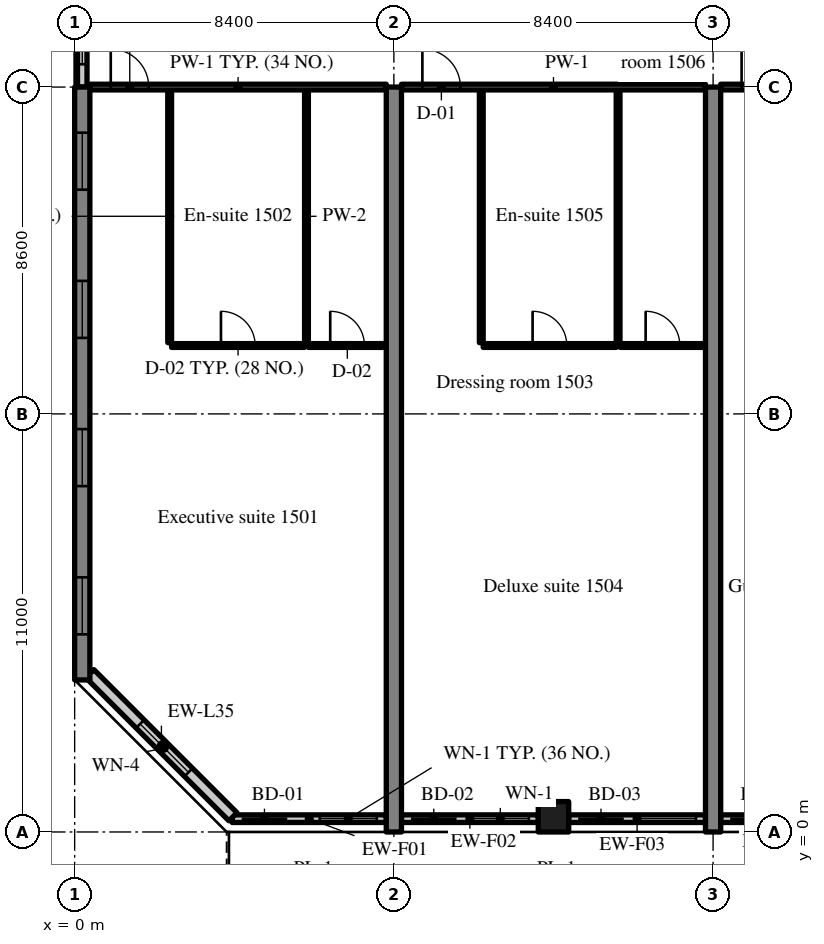
"""IFC4 building model, lengths in metres.
Left out: names, types, materials, properties, quantities, classifications, styles, units other than length and angle.
Written with IfcOpenShell. Run it as: python <this file> out.ifc"""

import sys

from ifc_helpers import new_model, si_unit, direction, frame, frame_2d, origin, origin_2d, place, context, subcontext, project, spatial, rectangle, extrude, source, transform, mapped, element, fill, save


model = new_model("IFC4")
c1 = context("Model", 3, precision=1e-05, world=origin(), true_north=direction((0.0, 1.0)))
c2 = subcontext(c1, "Body", "Model", "MODEL_VIEW")
j1 = project(units=[si_unit("LENGTHUNIT", "METRE"), si_unit("PLANEANGLEUNIT", "RADIAN")], contexts=[c1])
p1 = place(None, origin())
s1 = spatial("IfcSite", under=j1, at=p1, CompositionType="ELEMENT")
p2 = place(p1, origin())
s2 = spatial("IfcBuilding", under=s1, at=p2, CompositionType="ELEMENT")
p3 = place(p2, frame((0.0, 0.0, 65.8)))
s3 = spatial("IfcBuildingStorey", under=s2, at=p3, CompositionType="ELEMENT", Elevation=65.8)
m1 = source(origin(), c2, "Body", "SweptSolid", [
    extrude(rectangle(XDim=15.6, YDim=0.4, at=frame_2d((7.8, 0.0))), origin(), (0.0, 0.0, 1.0), 3.52),
])
p4 = place(p3, frame((0.2, 4.0, 0.0), z_axis=(0.0, 0.0, 1.0), x_axis=(0.0, 1.0, 0.0)))
e1 = element("IfcWall", 1, at=p4, inside=s3, PredefinedType="SHEAR", context=c2, shape_type="MappedRepresentation", body=[
    mapped(m1, transform((0.0, 0.0, 0.0), scale=1.0)),
])
m2 = source(origin(), c2, "Body", "SweptSolid", [
    extrude(rectangle(XDim=1.5, YDim=1.5, at=frame_2d((0.75, 0.75))), frame((0.0, 0.21, 0.0), z_axis=(0.0, -1.0, 0.0), x_axis=(1.0, 0.0, 0.0)), (0.0, 0.0, 1.0), 0.42),
])
p5 = place(p4, frame((1.2, 0.0, 0.9)))
e2 = element("IfcOpeningElement", 2, at=p5, cuts=e1, PredefinedType="OPENING", context=c2, shape_type="MappedRepresentation", body=[
    mapped(m2, transform((0.0, 0.0, 0.0), scale=1.0)),
])
p6 = place(p4, frame((5.1, 0.0, 0.9)))
e3 = element("IfcOpeningElement", 3, at=p6, cuts=e1, PredefinedType="OPENING", context=c2, shape_type="MappedRepresentation", body=[
    mapped(m2, transform((0.0, 0.0, 0.0), scale=1.0)),
])
p7 = place(p4, frame((9.0, 0.0, 0.9)))
e4 = element("IfcOpeningElement", 4, at=p7, cuts=e1, PredefinedType="OPENING", context=c2, shape_type="MappedRepresentation", body=[
    mapped(m2, transform((0.0, 0.0, 0.0), scale=1.0)),
])
p8 = place(p4, frame((12.9, 0.0, 0.9)))
e5 = element("IfcOpeningElement", 5, at=p8, cuts=e1, PredefinedType="OPENING", context=c2, shape_type="MappedRepresentation", body=[
    mapped(m2, transform((0.0, 0.0, 0.0), scale=1.0)),
])
m3 = source(origin(), c2, "Body", "SweptSolid", [
    extrude(rectangle(XDim=19.6, YDim=0.4, at=frame_2d((9.8, 0.0))), origin(), (0.0, 0.0, 1.0), 3.52),
])
for number, where, z_axis, x_axis in (
    (6, (8.4, 0.0, 0.0), (0.0, 0.0, 1.0), (0.0, 1.0, 0.0)),
    (7, (16.8, 0.0, 0.0), (0.0, 0.0, 1.0), (0.0, 1.0, 0.0)),
):
    element("IfcWall", number, at=place(p3, frame(where, z_axis=z_axis, x_axis=x_axis)), inside=s3, PredefinedType="SHEAR", context=c2, shape_type="MappedRepresentation", body=[
        mapped(m3, transform((0.0, 0.0, 0.0), scale=1.0)),
    ])
m4 = source(origin(), c2, "Body", "SweptSolid", [
    extrude(rectangle(XDim=0.8, YDim=0.8, at=origin_2d()), origin(), (0.0, 0.0, 1.0), 3.52),
])
p9 = place(p3, frame((12.6, 0.4, 0.0), z_axis=(0.0, 0.0, 1.0), x_axis=(1.0, 0.0, 0.0)))
e8 = element("IfcColumn", 8, at=p9, inside=s3, PredefinedType="COLUMN", context=c2, shape_type="MappedRepresentation", body=[
    mapped(m4, transform((0.0, 0.0, 0.0), scale=1.0)),
])
m5 = source(origin(), c2, "Body", "SweptSolid", [
    extrude(rectangle(XDim=4.055, YDim=0.2, at=frame_2d((2.027, 0.0))), origin(), (0.0, 0.0, 1.0), 2.82),
])
p10 = place(p3, frame((4.145, 0.35, 0.0), z_axis=(0.0, 0.0, 1.0), x_axis=(1.0, 0.0, 0.0)))
e9 = element("IfcWall", 9, at=p10, inside=s3, PredefinedType="SOLIDWALL", context=c2, shape_type="MappedRepresentation", body=[
    mapped(m5, transform((0.0, 0.0, 0.0), scale=1.0)),
])
m6 = source(origin(), c2, "Body", "SweptSolid", [
    extrude(rectangle(XDim=1.2, YDim=2.4, at=frame_2d((0.6, 1.2))), frame((0.0, 0.11, 0.0), z_axis=(0.0, -1.0, 0.0), x_axis=(1.0, 0.0, 0.0)), (0.0, 0.0, 1.0), 0.22),
])
p11 = place(p10, frame((0.25, 0.0, 0.0)))
e10 = element("IfcOpeningElement", 10, at=p11, cuts=e9, PredefinedType="OPENING", context=c2, shape_type="MappedRepresentation", body=[
    mapped(m6, transform((0.0, 0.0, 0.0), scale=1.0)),
])
m7 = source(origin(), c2, "Body", "SweptSolid", [
    extrude(rectangle(XDim=1.5, YDim=1.5, at=frame_2d((0.75, 0.75))), frame((0.0, 0.11, 0.0), z_axis=(0.0, -1.0, 0.0), x_axis=(1.0, 0.0, 0.0)), (0.0, 0.0, 1.0), 0.22),
])
p12 = place(p10, frame((2.305, 0.0, 0.9)))
e11 = element("IfcOpeningElement", 11, at=p12, cuts=e9, PredefinedType="OPENING", context=c2, shape_type="MappedRepresentation", body=[
    mapped(m7, transform((0.0, 0.0, 0.0), scale=1.0)),
])
m8 = source(origin(), c2, "Body", "SweptSolid", [
    extrude(rectangle(XDim=3.6, YDim=0.2, at=frame_2d((1.8, 0.0))), origin(), (0.0, 0.0, 1.0), 2.82),
])
p13 = place(p3, frame((8.6, 0.35, 0.0), z_axis=(0.0, 0.0, 1.0), x_axis=(1.0, 0.0, 0.0)))
e12 = element("IfcWall", 12, at=p13, inside=s3, PredefinedType="SOLIDWALL", context=c2, shape_type="MappedRepresentation", body=[
    mapped(m8, transform((0.0, 0.0, 0.0), scale=1.0)),
])
p14 = place(p13, frame((0.25, 0.0, 0.0)))
e13 = element("IfcOpeningElement", 13, at=p14, cuts=e12, PredefinedType="OPENING", context=c2, shape_type="MappedRepresentation", body=[
    mapped(m6, transform((0.0, 0.0, 0.0), scale=1.0)),
])
p15 = place(p13, frame((1.85, 0.0, 0.9)))
e14 = element("IfcOpeningElement", 14, at=p15, cuts=e12, PredefinedType="OPENING", context=c2, shape_type="MappedRepresentation", body=[
    mapped(m7, transform((0.0, 0.0, 0.0), scale=1.0)),
])
m9 = source(origin(), c2, "Body", "SweptSolid", [
    extrude(rectangle(XDim=3.6, YDim=0.2, at=frame_2d((1.8, 0.0))), origin(), (0.0, 0.0, 1.0), 2.82),
])
p16 = place(p3, frame((13.0, 0.35, 0.0), z_axis=(0.0, 0.0, 1.0), x_axis=(1.0, 0.0, 0.0)))
e15 = element("IfcWall", 15, at=p16, inside=s3, PredefinedType="SOLIDWALL", context=c2, shape_type="MappedRepresentation", body=[
    mapped(m9, transform((0.0, 0.0, 0.0), scale=1.0)),
])
p17 = place(p16, frame((0.25, 0.0, 0.0)))
e16 = element("IfcOpeningElement", 16, at=p17, cuts=e15, PredefinedType="OPENING", context=c2, shape_type="MappedRepresentation", body=[
    mapped(m6, transform((0.0, 0.0, 0.0), scale=1.0)),
])
p18 = place(p16, frame((1.85, 0.0, 0.9)))
e17 = element("IfcOpeningElement", 17, at=p18, cuts=e15, PredefinedType="OPENING", context=c2, shape_type="MappedRepresentation", body=[
    mapped(m7, transform((0.0, 0.0, 0.0), scale=1.0)),
])
p19 = place(p3, frame((17.0, 0.35, 0.0), z_axis=(0.0, 0.0, 1.0), x_axis=(1.0, 0.0, 0.0)))
e18 = element("IfcWall", 18, at=p19, inside=s3, PredefinedType="SOLIDWALL", context=c2, shape_type="MappedRepresentation", body=[
    mapped(m9, transform((0.0, 0.0, 0.0), scale=1.0)),
])
p20 = place(p19, frame((0.25, 0.0, 0.0)))
e19 = element("IfcOpeningElement", 19, at=p20, cuts=e18, PredefinedType="OPENING", context=c2, shape_type="MappedRepresentation", body=[
    mapped(m6, transform((0.0, 0.0, 0.0), scale=1.0)),
])
p21 = place(p19, frame((1.85, 0.0, 0.9)))
e20 = element("IfcOpeningElement", 20, at=p21, cuts=e18, PredefinedType="OPENING", context=c2, shape_type="MappedRepresentation", body=[
    mapped(m7, transform((0.0, 0.0, 0.0), scale=1.0)),
])
m10 = source(origin(), c2, "Body", "SweptSolid", [
    extrude(rectangle(XDim=5.326, YDim=0.3, at=frame_2d((2.663, 0.0))), origin(), (0.0, 0.0, 1.0), 3.52),
])
p22 = place(p3, frame((0.4, 4.166, 0.0), z_axis=(0.0, 0.0, 1.0), x_axis=(0.707106781187, -0.707106781187, 0.0)))
e21 = element("IfcWall", 21, at=p22, inside=s3, PredefinedType="SOLIDWALL", context=c2, shape_type="MappedRepresentation", body=[
    mapped(m10, transform((0.0, 0.0, 0.0), scale=1.0)),
])
m11 = source(origin(), c2, "Body", "SweptSolid", [
    extrude(rectangle(XDim=1.8, YDim=1.5, at=frame_2d((0.9, 0.75))), frame((0.0, 0.16, 0.0), z_axis=(0.0, -1.0, 0.0), x_axis=(1.0, 0.0, 0.0)), (0.0, 0.0, 1.0), 0.32),
])
p23 = place(p22, frame((1.871, 0.0, 0.9)))
e22 = element("IfcOpeningElement", 22, at=p23, cuts=e21, PredefinedType="OPENING", context=c2, shape_type="MappedRepresentation", body=[
    mapped(m11, transform((0.0, 0.0, 0.0), scale=1.0)),
])
m12 = source(origin(), c2, "Body", "SweptSolid", [
    extrude(rectangle(XDim=2.4, YDim=0.25, at=frame_2d((1.2, 0.0))), origin(), (0.0, 0.0, 1.0), 2.62),
])
p24 = place(p3, frame((0.2, 19.6, 0.0), z_axis=(0.0, 0.0, 1.0), x_axis=(0.0, 1.0, 0.0)))
e23 = element("IfcWall", 23, at=p24, inside=s3, PredefinedType="SOLIDWALL", context=c2, shape_type="MappedRepresentation", body=[
    mapped(m12, transform((0.0, 0.0, 0.0), scale=1.0)),
])
m13 = source(origin(), c2, "Body", "SweptSolid", [
    extrude(rectangle(XDim=1.2, YDim=1.5, at=frame_2d((0.6, 0.75))), frame((0.0, 0.135, 0.0), z_axis=(0.0, -1.0, 0.0), x_axis=(1.0, 0.0, 0.0)), (0.0, 0.0, 1.0), 0.27),
])
p25 = place(p24, frame((0.6, 0.0, 0.9)))
e24 = element("IfcOpeningElement", 24, at=p25, cuts=e23, PredefinedType="OPENING", context=c2, shape_type="MappedRepresentation", body=[
    mapped(m13, transform((0.0, 0.0, 0.0), scale=1.0)),
])
m14 = source(origin(), c2, "Body", "SweptSolid", [
    extrude(rectangle(XDim=6.65, YDim=0.1, at=frame_2d((3.325, 0.0))), origin(), (0.0, 0.0, 1.0), 3.52),
])
for number, where, z_axis, x_axis in (
    (25, (2.5, 12.875, 0.0), (0.0, 0.0, 1.0), (0.0, 1.0, 0.0)),
    (26, (6.1, 12.875, 0.0), (0.0, 0.0, 1.0), (0.0, 1.0, 0.0)),
):
    element("IfcWall", number, at=place(p3, frame(where, z_axis=z_axis, x_axis=x_axis)), inside=s3, PredefinedType="PARTITIONING", context=c2, shape_type="MappedRepresentation", body=[
        mapped(m14, transform((0.0, 0.0, 0.0), scale=1.0)),
    ])
m15 = source(origin(), c2, "Body", "SweptSolid", [
    extrude(rectangle(XDim=3.5, YDim=0.1, at=frame_2d((1.75, 0.0))), origin(), (0.0, 0.0, 1.0), 3.52),
])
p26 = place(p3, frame((2.55, 12.8, 0.0), z_axis=(0.0, 0.0, 1.0), x_axis=(1.0, 0.0, 0.0)))
e27 = element("IfcWall", 27, at=p26, inside=s3, PredefinedType="PARTITIONING", context=c2, shape_type="MappedRepresentation", body=[
    mapped(m15, transform((0.0, 0.0, 0.0), scale=1.0)),
])
m16 = source(origin(), c2, "Body", "SweptSolid", [
    extrude(rectangle(XDim=0.9, YDim=2.1, at=frame_2d((0.45, 1.05))), frame((0.0, 0.06, 0.0), z_axis=(0.0, -1.0, 0.0), x_axis=(1.0, 0.0, 0.0)), (0.0, 0.0, 1.0), 0.12),
])
p27 = place(p26, frame((1.3, 0.0, 0.0)))
e28 = element("IfcOpeningElement", 28, at=p27, cuts=e27, PredefinedType="OPENING", context=c2, shape_type="MappedRepresentation", body=[
    mapped(m16, transform((0.0, 0.0, 0.0), scale=1.0)),
])
m17 = source(origin(), c2, "Body", "SweptSolid", [
    extrude(rectangle(XDim=2.05, YDim=0.1, at=frame_2d((1.025, 0.0))), origin(), (0.0, 0.0, 1.0), 3.52),
])
p28 = place(p3, frame((6.15, 12.8, 0.0), z_axis=(0.0, 0.0, 1.0), x_axis=(1.0, 0.0, 0.0)))
e29 = element("IfcWall", 29, at=p28, inside=s3, PredefinedType="PARTITIONING", context=c2, shape_type="MappedRepresentation", body=[
    mapped(m17, transform((0.0, 0.0, 0.0), scale=1.0)),
])
p29 = place(p28, frame((0.575, 0.0, 0.0)))
e30 = element("IfcOpeningElement", 30, at=p29, cuts=e29, PredefinedType="OPENING", context=c2, shape_type="MappedRepresentation", body=[
    mapped(m16, transform((0.0, 0.0, 0.0), scale=1.0)),
])
m18 = source(origin(), c2, "Body", "SweptSolid", [
    extrude(rectangle(XDim=7.8, YDim=0.15, at=frame_2d((3.9, 0.0))), origin(), (0.0, 0.0, 1.0), 2.82),
])
p30 = place(p3, frame((0.4, 19.6, 0.0), z_axis=(0.0, 0.0, 1.0), x_axis=(1.0, 0.0, 0.0)))
e31 = element("IfcWall", 31, at=p30, inside=s3, PredefinedType="PARTITIONING", context=c2, shape_type="MappedRepresentation", body=[
    mapped(m18, transform((0.0, 0.0, 0.0), scale=1.0)),
])
m19 = source(origin(), c2, "Body", "SweptSolid", [
    extrude(rectangle(XDim=1.0, YDim=2.1, at=frame_2d((0.5, 1.05))), frame((0.0, 0.085, 0.0), z_axis=(0.0, -1.0, 0.0), x_axis=(1.0, 0.0, 0.0)), (0.0, 0.0, 1.0), 0.17),
])
p31 = place(p30, frame((0.55, 0.0, 0.0)))
e32 = element("IfcOpeningElement", 32, at=p31, cuts=e31, PredefinedType="OPENING", context=c2, shape_type="MappedRepresentation", body=[
    mapped(m19, transform((0.0, 0.0, 0.0), scale=1.0)),
])
for number, where, z_axis, x_axis in (
    (33, (10.7, 12.875, 0.0), (0.0, 0.0, 1.0), (0.0, 1.0, 0.0)),
    (34, (14.3, 12.875, 0.0), (0.0, 0.0, 1.0), (0.0, 1.0, 0.0)),
):
    element("IfcWall", number, at=place(p3, frame(where, z_axis=z_axis, x_axis=x_axis)), inside=s3, PredefinedType="PARTITIONING", context=c2, shape_type="MappedRepresentation", body=[
        mapped(m14, transform((0.0, 0.0, 0.0), scale=1.0)),
    ])
p32 = place(p3, frame((10.75, 12.8, 0.0), z_axis=(0.0, 0.0, 1.0), x_axis=(1.0, 0.0, 0.0)))
e35 = element("IfcWall", 35, at=p32, inside=s3, PredefinedType="PARTITIONING", context=c2, shape_type="MappedRepresentation", body=[
    mapped(m15, transform((0.0, 0.0, 0.0), scale=1.0)),
])
p33 = place(p32, frame((1.3, 0.0, 0.0)))
e36 = element("IfcOpeningElement", 36, at=p33, cuts=e35, PredefinedType="OPENING", context=c2, shape_type="MappedRepresentation", body=[
    mapped(m16, transform((0.0, 0.0, 0.0), scale=1.0)),
])
m20 = source(origin(), c2, "Body", "SweptSolid", [
    extrude(rectangle(XDim=2.25, YDim=0.1, at=frame_2d((1.125, 0.0))), origin(), (0.0, 0.0, 1.0), 3.52),
])
p34 = place(p3, frame((14.35, 12.8, 0.0), z_axis=(0.0, 0.0, 1.0), x_axis=(1.0, 0.0, 0.0)))
e37 = element("IfcWall", 37, at=p34, inside=s3, PredefinedType="PARTITIONING", context=c2, shape_type="MappedRepresentation", body=[
    mapped(m20, transform((0.0, 0.0, 0.0), scale=1.0)),
])
p35 = place(p34, frame((0.675, 0.0, 0.0)))
e38 = element("IfcOpeningElement", 38, at=p35, cuts=e37, PredefinedType="OPENING", context=c2, shape_type="MappedRepresentation", body=[
    mapped(m16, transform((0.0, 0.0, 0.0), scale=1.0)),
])
m21 = source(origin(), c2, "Body", "SweptSolid", [
    extrude(rectangle(XDim=8.0, YDim=0.15, at=frame_2d((4.0, 0.0))), origin(), (0.0, 0.0, 1.0), 2.82),
])
p36 = place(p3, frame((8.6, 19.6, 0.0), z_axis=(0.0, 0.0, 1.0), x_axis=(1.0, 0.0, 0.0)))
e39 = element("IfcWall", 39, at=p36, inside=s3, PredefinedType="PARTITIONING", context=c2, shape_type="MappedRepresentation", body=[
    mapped(m21, transform((0.0, 0.0, 0.0), scale=1.0)),
])
p37 = place(p36, frame((0.55, 0.0, 0.0)))
e40 = element("IfcOpeningElement", 40, at=p37, cuts=e39, PredefinedType="OPENING", context=c2, shape_type="MappedRepresentation", body=[
    mapped(m19, transform((0.0, 0.0, 0.0), scale=1.0)),
])
m22 = source(origin(), c2, "Body", "SweptSolid", [
    extrude(rectangle(XDim=3.925, YDim=0.15, at=frame_2d((1.962, 0.0))), origin(), (0.0, 0.0, 1.0), 2.82),
])
p38 = place(p3, frame((17.0, 19.6, 0.0), z_axis=(0.0, 0.0, 1.0), x_axis=(1.0, 0.0, 0.0)))
e41 = element("IfcWall", 41, at=p38, inside=s3, PredefinedType="PARTITIONING", context=c2, shape_type="MappedRepresentation", body=[
    mapped(m22, transform((0.0, 0.0, 0.0), scale=1.0)),
])
p39 = place(p38, frame((0.55, 0.0, 0.0)))
e42 = element("IfcOpeningElement", 42, at=p39, cuts=e41, PredefinedType="OPENING", context=c2, shape_type="MappedRepresentation", body=[
    mapped(m19, transform((0.0, 0.0, 0.0), scale=1.0)),
])
m23 = source(origin(), c2, "Body", "SweptSolid", [
    extrude(rectangle(XDim=1.2, YDim=2.4, at=frame_2d((0.6, 1.2))), frame((0.0, 0.025, 0.0), z_axis=(0.0, -1.0, 0.0), x_axis=(1.0, 0.0, 0.0)), (0.0, 0.0, 1.0), 0.05),
])
p40 = place(p11, origin())
e43 = element("IfcDoor", 43, at=p40, inside=s3, OperationType="SLIDING_TO_LEFT", PredefinedType="DOOR", context=c2, shape_type="MappedRepresentation", body=[
    mapped(m23, transform((0.0, 0.0, 0.0), scale=1.0)),
])
fill(e10, e43)
m24 = source(origin(), c2, "Body", "SweptSolid", [
    extrude(rectangle(XDim=1.5, YDim=1.5, at=frame_2d((0.75, 0.75))), frame((0.0, 0.03, 0.0), z_axis=(0.0, -1.0, 0.0), x_axis=(1.0, 0.0, 0.0)), (0.0, 0.0, 1.0), 0.06),
])
p41 = place(p12, origin())
e44 = element("IfcWindow", 44, at=p41, inside=s3, PartitioningType="SINGLE_PANEL", PredefinedType="WINDOW", context=c2, shape_type="MappedRepresentation", body=[
    mapped(m24, transform((0.0, 0.0, 0.0), scale=1.0)),
])
fill(e11, e44)
p42 = place(p14, origin())
e45 = element("IfcDoor", 45, at=p42, inside=s3, OperationType="SLIDING_TO_RIGHT", PredefinedType="DOOR", context=c2, shape_type="MappedRepresentation", body=[
    mapped(m23, transform((0.0, 0.0, 0.0), scale=1.0)),
])
fill(e13, e45)
p43 = place(p15, origin())
e46 = element("IfcWindow", 46, at=p43, inside=s3, PartitioningType="SINGLE_PANEL", PredefinedType="WINDOW", context=c2, shape_type="MappedRepresentation", body=[
    mapped(m24, transform((0.0, 0.0, 0.0), scale=1.0)),
])
fill(e14, e46)
p44 = place(p17, origin())
e47 = element("IfcDoor", 47, at=p44, inside=s3, OperationType="SLIDING_TO_LEFT", PredefinedType="DOOR", context=c2, shape_type="MappedRepresentation", body=[
    mapped(m23, transform((0.0, 0.0, 0.0), scale=1.0)),
])
fill(e16, e47)
p45 = place(p18, origin())
e48 = element("IfcWindow", 48, at=p45, inside=s3, PartitioningType="SINGLE_PANEL", PredefinedType="WINDOW", context=c2, shape_type="MappedRepresentation", body=[
    mapped(m24, transform((0.0, 0.0, 0.0), scale=1.0)),
])
fill(e17, e48)
p46 = place(p20, origin())
e49 = element("IfcDoor", 49, at=p46, inside=s3, OperationType="SLIDING_TO_RIGHT", PredefinedType="DOOR", context=c2, shape_type="MappedRepresentation", body=[
    mapped(m23, transform((0.0, 0.0, 0.0), scale=1.0)),
])
fill(e19, e49)
m25 = source(origin(), c2, "Body", "SweptSolid", [
    extrude(rectangle(XDim=1.8, YDim=1.5, at=frame_2d((0.9, 0.75))), frame((0.0, 0.03, 0.0), z_axis=(0.0, -1.0, 0.0), x_axis=(1.0, 0.0, 0.0)), (0.0, 0.0, 1.0), 0.06),
])
p47 = place(p23, origin())
e50 = element("IfcWindow", 50, at=p47, inside=s3, PartitioningType="SINGLE_PANEL", PredefinedType="WINDOW", context=c2, shape_type="MappedRepresentation", body=[
    mapped(m25, transform((0.0, 0.0, 0.0), scale=1.0)),
])
fill(e22, e50)
p48 = place(p5, origin())
e51 = element("IfcWindow", 51, at=p48, inside=s3, PartitioningType="SINGLE_PANEL", PredefinedType="WINDOW", context=c2, shape_type="MappedRepresentation", body=[
    mapped(m24, transform((0.0, 0.0, 0.0), scale=1.0)),
])
fill(e2, e51)
p49 = place(p6, origin())
e52 = element("IfcWindow", 52, at=p49, inside=s3, PartitioningType="SINGLE_PANEL", PredefinedType="WINDOW", context=c2, shape_type="MappedRepresentation", body=[
    mapped(m24, transform((0.0, 0.0, 0.0), scale=1.0)),
])
fill(e3, e52)
p50 = place(p7, origin())
e53 = element("IfcWindow", 53, at=p50, inside=s3, PartitioningType="SINGLE_PANEL", PredefinedType="WINDOW", context=c2, shape_type="MappedRepresentation", body=[
    mapped(m24, transform((0.0, 0.0, 0.0), scale=1.0)),
])
fill(e4, e53)
p51 = place(p8, origin())
e54 = element("IfcWindow", 54, at=p51, inside=s3, PartitioningType="SINGLE_PANEL", PredefinedType="WINDOW", context=c2, shape_type="MappedRepresentation", body=[
    mapped(m24, transform((0.0, 0.0, 0.0), scale=1.0)),
])
fill(e5, e54)
m26 = source(origin(), c2, "Body", "SweptSolid", [
    extrude(rectangle(XDim=1.2, YDim=1.5, at=frame_2d((0.6, 0.75))), frame((0.0, 0.03, 0.0), z_axis=(0.0, -1.0, 0.0), x_axis=(1.0, 0.0, 0.0)), (0.0, 0.0, 1.0), 0.06),
])
p52 = place(p25, origin())
e55 = element("IfcWindow", 55, at=p52, inside=s3, PartitioningType="SINGLE_PANEL", PredefinedType="WINDOW", context=c2, shape_type="MappedRepresentation", body=[
    mapped(m26, transform((0.0, 0.0, 0.0), scale=1.0)),
])
fill(e24, e55)
m27 = source(origin(), c2, "Body", "SweptSolid", [
    extrude(rectangle(XDim=0.9, YDim=2.1, at=frame_2d((0.45, 1.05))), frame((0.0, 0.025, 0.0), z_axis=(0.0, -1.0, 0.0), x_axis=(1.0, 0.0, 0.0)), (0.0, 0.0, 1.0), 0.05),
])
p53 = place(p27, origin())
e56 = element("IfcDoor", 56, at=p53, inside=s3, OperationType="SINGLE_SWING_LEFT", PredefinedType="DOOR", context=c2, shape_type="MappedRepresentation", body=[
    mapped(m27, transform((0.0, 0.0, 0.0), scale=1.0)),
])
fill(e28, e56)
p54 = place(p29, origin())
e57 = element("IfcDoor", 57, at=p54, inside=s3, OperationType="SINGLE_SWING_LEFT", PredefinedType="DOOR", context=c2, shape_type="MappedRepresentation", body=[
    mapped(m27, transform((0.0, 0.0, 0.0), scale=1.0)),
])
fill(e30, e57)
m28 = source(origin(), c2, "Body", "SweptSolid", [
    extrude(rectangle(XDim=1.0, YDim=2.1, at=frame_2d((0.5, 1.05))), frame((0.0, 0.025, 0.0), z_axis=(0.0, -1.0, 0.0), x_axis=(1.0, 0.0, 0.0)), (0.0, 0.0, 1.0), 0.05),
])
p55 = place(p31, origin())
e58 = element("IfcDoor", 58, at=p55, inside=s3, OperationType="SINGLE_SWING_LEFT", PredefinedType="DOOR", context=c2, shape_type="MappedRepresentation", body=[
    mapped(m28, transform((0.0, 0.0, 0.0), scale=1.0)),
])
fill(e32, e58)
p56 = place(p33, origin())
e59 = element("IfcDoor", 59, at=p56, inside=s3, OperationType="SINGLE_SWING_LEFT", PredefinedType="DOOR", context=c2, shape_type="MappedRepresentation", body=[
    mapped(m27, transform((0.0, 0.0, 0.0), scale=1.0)),
])
fill(e36, e59)
p57 = place(p35, origin())
e60 = element("IfcDoor", 60, at=p57, inside=s3, OperationType="SINGLE_SWING_LEFT", PredefinedType="DOOR", context=c2, shape_type="MappedRepresentation", body=[
    mapped(m27, transform((0.0, 0.0, 0.0), scale=1.0)),
])
fill(e38, e60)
p58 = place(p37, origin())
e61 = element("IfcDoor", 61, at=p58, inside=s3, OperationType="SINGLE_SWING_LEFT", PredefinedType="DOOR", context=c2, shape_type="MappedRepresentation", body=[
    mapped(m28, transform((0.0, 0.0, 0.0), scale=1.0)),
])
fill(e40, e61)
p59 = place(p39, origin())
e62 = element("IfcDoor", 62, at=p59, inside=s3, OperationType="SINGLE_SWING_LEFT", PredefinedType="DOOR", context=c2, shape_type="MappedRepresentation", body=[
    mapped(m28, transform((0.0, 0.0, 0.0), scale=1.0)),
])
fill(e42, e62)
save(model, sys.argv[1])
